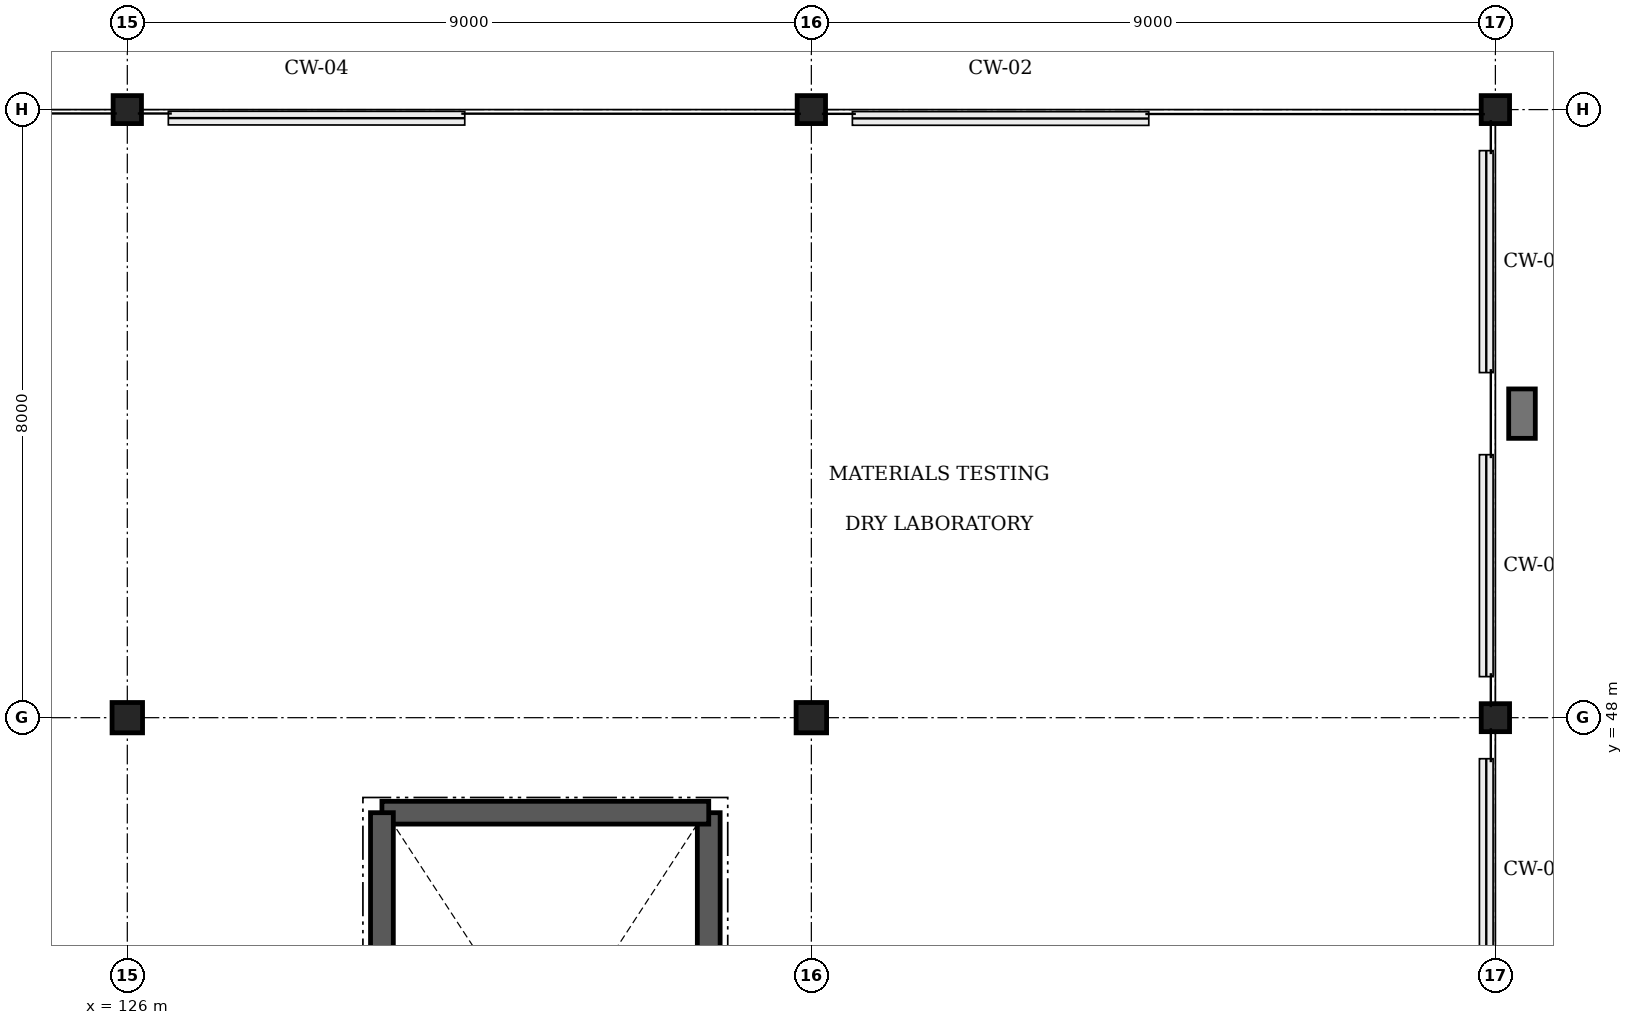
"""IFC4 building model, lengths in metres.
Left out: names, types, materials, properties, quantities, classifications, styles, units other than length and angle.
Written with IfcOpenShell. Run it as: python <this file> out.ifc"""

import sys

from ifc_helpers import new_model, si_unit, direction, frame, frame_2d, origin, origin_2d, place, context, subcontext, project, spatial, rectangle, i_section, extrude, element, save


model = new_model("IFC4")
c1 = context("Model", 3, precision=1e-05, world=origin(), true_north=direction((0.0, 1.0)))
c2 = subcontext(c1, "Body", "Model", "MODEL_VIEW")
j1 = project(units=[si_unit("LENGTHUNIT", "METRE"), si_unit("PLANEANGLEUNIT", "RADIAN")], contexts=[c1])
p1 = place(None, origin())
s1 = spatial("IfcSite", under=j1, at=p1, CompositionType="ELEMENT")
p2 = place(p1, origin())
s2 = spatial("IfcBuilding", under=s1, at=p2, CompositionType="ELEMENT")
p3 = place(p2, frame((0.0, 0.0, 10.8)))
s3 = spatial("IfcBuildingStorey", under=s2, at=p3, CompositionType="ELEMENT", Elevation=10.8)
p4 = place(p3, frame((126.0, 48.0, 0.0), z_axis=(0.0, 0.0, 1.0), x_axis=(1.0, 0.0, 0.0)))
e1 = element("IfcColumn", 1, at=p4, inside=s3, PredefinedType="COLUMN", context=c2, shape_type="SweptSolid", body=[
    extrude(i_section(OverallWidth=0.401, OverallDepth=0.399, WebThickness=0.025, FlangeThickness=0.04, FilletRadius=0.015, at=origin_2d()), origin(), (0.0, 0.0, 1.0), 4.8),
])
p5 = place(p3, frame((126.0, 56.0, 0.0), z_axis=(0.0, 0.0, 1.0), x_axis=(1.0, 0.0, 0.0)))
e2 = element("IfcColumn", 2, at=p5, inside=s3, PredefinedType="COLUMN", context=c2, shape_type="SweptSolid", body=[
    extrude(i_section(OverallWidth=0.373, OverallDepth=0.368, WebThickness=0.015, FlangeThickness=0.024, FilletRadius=0.015, at=origin_2d()), origin(), (0.0, 0.0, 1.0), 4.8),
])
p6 = place(p3, frame((135.0, 48.0, 0.0), z_axis=(0.0, 0.0, 1.0), x_axis=(1.0, 0.0, 0.0)))
e3 = element("IfcColumn", 3, at=p6, inside=s3, PredefinedType="COLUMN", context=c2, shape_type="SweptSolid", body=[
    extrude(i_section(OverallWidth=0.401, OverallDepth=0.399, WebThickness=0.025, FlangeThickness=0.04, FilletRadius=0.015, at=origin_2d()), origin(), (0.0, 0.0, 1.0), 4.8),
])
for number, where, z_axis, x_axis in (
    (4, (135.0, 56.0, 0.0), (0.0, 0.0, 1.0), (1.0, 0.0, 0.0)),
    (5, (144.0, 48.0, 0.0), (0.0, 0.0, 1.0), (1.0, 0.0, 0.0)),
    (6, (144.0, 56.0, 0.0), (0.0, 0.0, 1.0), (1.0, 0.0, 0.0)),
):
    element("IfcColumn", number, at=place(p3, frame(where, z_axis=z_axis, x_axis=x_axis)), inside=s3, PredefinedType="COLUMN", context=c2, shape_type="SweptSolid", body=[
        extrude(i_section(OverallWidth=0.373, OverallDepth=0.368, WebThickness=0.015, FlangeThickness=0.024, FilletRadius=0.015, at=origin_2d()), origin(), (0.0, 0.0, 1.0), 4.8),
    ])
p7 = place(p3, frame((144.35, 52.0, 0.0), z_axis=(0.0, 0.0, 1.0), x_axis=(0.0, 1.0, 0.0)))
e7 = element("IfcColumn", 7, at=p7, inside=s3, PredefinedType="PILASTER", context=c2, shape_type="SweptSolid", body=[
    extrude(rectangle(XDim=0.65, YDim=0.35, at=origin_2d()), origin(), (0.0, 0.0, 1.0), 4.8),
])
p8 = place(p3, frame((133.65, 38.35, 0.0), z_axis=(0.0, 0.0, 1.0), x_axis=(0.0, 1.0, 0.0)))
e8 = element("IfcWall", 8, at=p8, inside=s3, PredefinedType="SOLIDWALL", context=c2, shape_type="SweptSolid", body=[
    extrude(rectangle(XDim=8.4, YDim=0.3, at=frame_2d((4.2, 0.0))), origin(), (0.0, 0.0, 1.0), 4.8),
])
p9 = place(p3, frame((133.65, 46.75, 0.0), z_axis=(0.0, 0.0, 1.0), x_axis=(-1.0, 0.0, 0.0)))
e9 = element("IfcWall", 9, at=p9, inside=s3, PredefinedType="SOLIDWALL", context=c2, shape_type="SweptSolid", body=[
    extrude(rectangle(XDim=4.3, YDim=0.3, at=frame_2d((2.15, 0.0))), origin(), (0.0, 0.0, 1.0), 4.8),
])
p10 = place(p3, frame((129.35, 38.35, 0.0), z_axis=(0.0, 0.0, 1.0), x_axis=(0.0, 1.0, 0.0)))
e10 = element("IfcWall", 10, at=p10, inside=s3, PredefinedType="SOLIDWALL", context=c2, shape_type="SweptSolid", body=[
    extrude(rectangle(XDim=8.4, YDim=0.3, at=frame_2d((4.2, 0.0))), origin(), (0.0, 0.0, 1.0), 4.8),
])
save(model, sys.argv[1])
